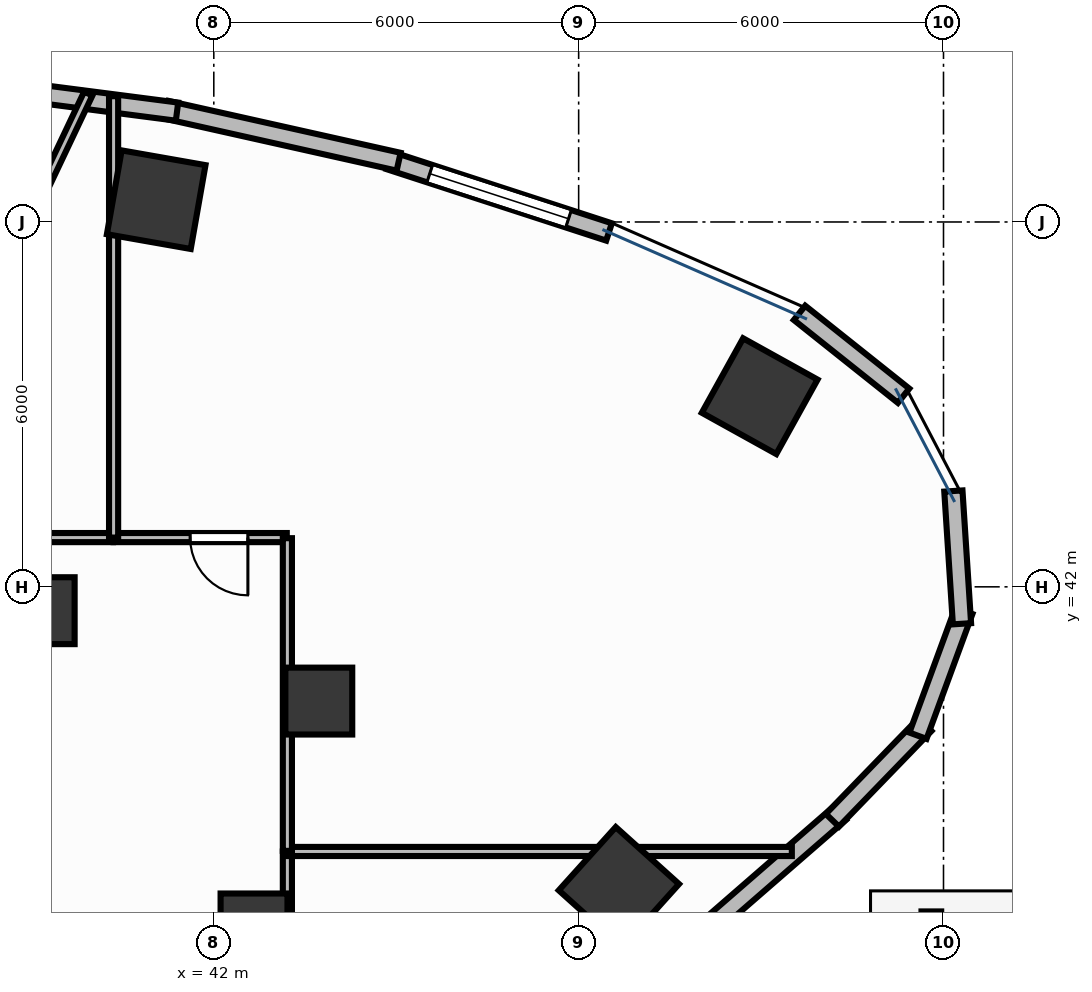
"""IFC4 building model, lengths in metres.
Left out: names, types, materials, properties, quantities, classifications, styles, units other than length and angle.
Written with IfcOpenShell. Run it as: python <this file> out.ifc"""

import sys

from ifc_helpers import new_model, si_unit, direction, frame, frame_2d, origin, origin_2d, place, context, subcontext, project, spatial, rectangle, hollow_circle, extrude, element, fill, save


model = new_model("IFC4")
c1 = context("Model", 3, precision=1e-05, world=origin(), true_north=direction((0.0, 1.0)))
c2 = subcontext(c1, "Body", "Model", "MODEL_VIEW")
j1 = project(units=[si_unit("LENGTHUNIT", "METRE"), si_unit("PLANEANGLEUNIT", "RADIAN")], contexts=[c1])
p1 = place(None, origin())
s1 = spatial("IfcSite", under=j1, at=p1, CompositionType="ELEMENT")
p2 = place(p1, origin())
s2 = spatial("IfcBuilding", under=s1, at=p2, CompositionType="ELEMENT")
p3 = place(p2, frame((0.0, 0.0, 10.2)))
s3 = spatial("IfcBuildingStorey", under=s2, at=p3, CompositionType="ELEMENT", Elevation=10.2)
p4 = place(p3, frame((50.977, 45.135, -0.0), z_axis=(0.0, 0.0, 1.0), x_axis=(-0.874535078577, 0.484962262797, 0.0)))
e1 = element("IfcColumn", 1, at=p4, inside=s3, PredefinedType="COLUMN", context=c2, shape_type="SweptSolid", body=[
    extrude(rectangle(XDim=1.4, YDim=1.4, at=origin_2d()), origin(), (0.0, 0.0, 1.0), 4.451),
])
p5 = place(p3, frame((43.727, 40.121, -0.0), z_axis=(0.0, 0.0, 1.0), x_axis=(1.0, 0.0, 0.0)))
e2 = element("IfcColumn", 2, at=p5, inside=s3, PredefinedType="COLUMN", context=c2, shape_type="SweptSolid", body=[
    extrude(rectangle(XDim=1.1, YDim=1.1, at=origin_2d()), origin(), (0.0, 0.0, 1.0), 4.451),
])
p6 = place(p3, frame((41.052, 48.367, -0.0), z_axis=(0.0, 0.0, 1.0), x_axis=(-0.984868307662, 0.173304404339, 0.0)))
e3 = element("IfcColumn", 3, at=p6, inside=s3, PredefinedType="COLUMN", context=c2, shape_type="SweptSolid", body=[
    extrude(rectangle(XDim=1.4, YDim=1.4, at=origin_2d()), origin(), (0.0, 0.0, 1.0), 4.451),
])
p7 = place(p3, frame((39.161, 41.608, -0.0), z_axis=(0.0, 0.0, 1.0), x_axis=(1.0, 0.0, 0.0)))
e4 = element("IfcColumn", 4, at=p7, inside=s3, PredefinedType="COLUMN", context=c2, shape_type="SweptSolid", body=[
    extrude(rectangle(XDim=1.1, YDim=1.1, at=origin_2d()), origin(), (0.0, 0.0, 1.0), 4.451),
])
p8 = place(p3, frame((48.662, 37.061, -0.0), z_axis=(0.0, 0.0, 1.0), x_axis=(0.669130606359, 0.743144825477, 0.0)))
e5 = element("IfcColumn", 5, at=p8, inside=s3, PredefinedType="COLUMN", context=c2, shape_type="SweptSolid", body=[
    extrude(rectangle(XDim=1.4, YDim=1.4, at=origin_2d()), origin(), (0.0, 0.0, 1.0), 4.451),
])
p9 = place(p3, frame((42.662, 36.407, -0.0), z_axis=(0.0, 0.0, 1.0), x_axis=(1.0, 0.0, 0.0)))
e6 = element("IfcColumn", 6, at=p9, inside=s3, PredefinedType="COLUMN", context=c2, shape_type="SweptSolid", body=[
    extrude(rectangle(XDim=1.1, YDim=1.1, at=origin_2d()), origin(), (0.0, 0.0, 1.0), 4.451),
])
p10 = place(p3, frame((53.8, 36.5, -0.24), z_axis=(0.0, 0.0, 1.0), x_axis=(1.0, 0.0, 0.0)))
e7 = element("IfcColumn", 7, at=p10, inside=s3, PredefinedType="COLUMN", context=c2, shape_type="SweptSolid", body=[
    extrude(hollow_circle(Radius=0.162, WallThickness=0.016, at=origin_2d()), origin(), (0.0, 0.0, 1.0), 5.04),
])
p11 = place(p3, frame((48.5, 47.836, 0.0), z_axis=(0.0, 0.0, 1.0), x_axis=(-0.950958033078, 0.30931993037, 0.0)))
e8 = element("IfcWall", 8, at=p11, inside=s3, PredefinedType="STANDARD", context=c2, shape_type="SweptSolid", body=[
    extrude(rectangle(XDim=3.8, YDim=0.3, at=frame_2d((1.9, 0.0))), origin(), (0.0, 0.0, 1.0), 4.45),
])
p12 = place(p11, frame((0.7, 0.0, 1.5)))
e9 = element("IfcOpeningElement", 9, at=p12, cuts=e8, PredefinedType="OPENING", context=c2, shape_type="SweptSolid", body=[
    extrude(rectangle(XDim=2.4, YDim=1.2, at=frame_2d((1.2, 0.6))), frame((0.0, 0.165, 0.0), z_axis=(0.0, -1.0, 0.0), x_axis=(1.0, 0.0, 0.0)), (0.0, 0.0, 1.0), 0.33),
])
p13 = place(p3, frame((45.04, 48.991, 0.0), z_axis=(0.0, 0.0, 1.0), x_axis=(-0.975868573345, 0.218358713032, 0.0)))
e10 = element("IfcWall", 10, at=p13, inside=s3, PredefinedType="STANDARD", context=c2, shape_type="SweptSolid", body=[
    extrude(rectangle(XDim=3.909, YDim=0.3, at=frame_2d((1.954, 0.0))), origin(), (0.0, 0.0, 1.0), 4.45),
])
p14 = place(p3, frame((41.395, 49.815, 0.0), z_axis=(0.0, 0.0, 1.0), x_axis=(-0.991734095036, 0.128310111617, 0.0)))
e11 = element("IfcWall", 11, at=p14, inside=s3, PredefinedType="STANDARD", context=c2, shape_type="SweptSolid", body=[
    extrude(rectangle(XDim=3.956, YDim=0.3, at=frame_2d((1.978, 0.0))), origin(), (0.0, 0.0, 1.0), 4.45),
])
p15 = place(p3, frame((49.709, 36.029, 0.0), z_axis=(0.0, 0.0, 1.0), x_axis=(0.754746490246, 0.656016566454, 0.0)))
e12 = element("IfcWall", 12, at=p15, inside=s3, PredefinedType="STANDARD", context=c2, shape_type="SweptSolid", body=[
    extrude(rectangle(XDim=3.43, YDim=0.3, at=frame_2d((1.715, 0.0))), origin(), (0.0, 0.0, 1.0), 4.45),
])
p16 = place(p3, frame((52.173, 38.161, 0.0), z_axis=(0.0, 0.0, 1.0), x_axis=(0.695404695719, 0.718618333451, 0.0)))
e13 = element("IfcWall", 13, at=p16, inside=s3, PredefinedType="STANDARD", context=c2, shape_type="SweptSolid", body=[
    extrude(rectangle(XDim=2.188, YDim=0.3, at=frame_2d((1.094, 0.0))), origin(), (0.0, 0.0, 1.0), 4.45),
])
for number, where, z_axis, x_axis in (
    (14, (53.58, 39.552, 0.0), (0.0, 0.0, 1.0), (0.345, 0.939, 0.0)),
    (15, (54.304, 41.393, 0.0), (0.0, 0.0, 1.0), (-0.065, 0.998, 0.0)),
    (16, (53.344, 45.143, 0.0), (0.0, 0.0, 1.0), (-0.782, 0.623, 0.0)),
):
    element("IfcWall", number, at=place(p3, frame(where, z_axis=z_axis, x_axis=x_axis)), inside=s3, PredefinedType="STANDARD", context=c2, shape_type="SweptSolid", body=[
        extrude(rectangle(XDim=2.188, YDim=0.3, at=frame_2d((1.094, 0.0))), origin(), (0.0, 0.0, 1.0), 4.45),
    ])
p17 = place(p3, frame((43.21, 26.635, 0.0), z_axis=(0.0, 0.0, 1.0), x_axis=(0.0, 1.0, 0.0)))
e17 = element("IfcWall", 17, at=p17, inside=s3, PredefinedType="PARTITIONING", context=c2, shape_type="SweptSolid", body=[
    extrude(rectangle(XDim=11.013, YDim=0.15, at=frame_2d((5.506, 0.0))), origin(), (0.0, 0.0, 1.0), 3.46),
])
p18 = place(p17, frame((3.85, 0.0, 0.0)))
e18 = element("IfcOpeningElement", 18, at=p18, cuts=e17, PredefinedType="OPENING", context=c2, shape_type="SweptSolid", body=[
    extrude(rectangle(XDim=0.95, YDim=2.15, at=frame_2d((0.475, 1.075))), frame((0.0, 0.09, 0.0), z_axis=(0.0, -1.0, 0.0), x_axis=(1.0, 0.0, 0.0)), (0.0, 0.0, 1.0), 0.18),
])
p19 = place(p3, frame((43.2, 42.81, 0.0), z_axis=(0.0, 0.0, 1.0), x_axis=(-1.0, 0.0, 0.0)))
e19 = element("IfcWall", 19, at=p19, inside=s3, PredefinedType="PARTITIONING", context=c2, shape_type="SweptSolid", body=[
    extrude(rectangle(XDim=2.848, YDim=0.15, at=frame_2d((1.424, 0.0))), origin(), (0.0, 0.0, 1.0), 3.46),
])
p20 = place(p19, frame((0.639, 0.0, 0.0)))
e20 = element("IfcOpeningElement", 20, at=p20, cuts=e19, PredefinedType="OPENING", context=c2, shape_type="SweptSolid", body=[
    extrude(rectangle(XDim=0.95, YDim=2.15, at=frame_2d((0.475, 1.075))), frame((0.0, 0.09, 0.0), z_axis=(0.0, -1.0, 0.0), x_axis=(1.0, 0.0, 0.0)), (0.0, 0.0, 1.0), 0.18),
])
p21 = place(p3, frame((40.342, 42.81, 0.0), z_axis=(0.0, 0.0, 1.0), x_axis=(-1.0, 0.0, 0.0)))
e21 = element("IfcWall", 21, at=p21, inside=s3, PredefinedType="PARTITIONING", context=c2, shape_type="SweptSolid", body=[
    extrude(rectangle(XDim=3.869, YDim=0.15, at=frame_2d((1.934, 0.0))), origin(), (0.0, 0.0, 1.0), 3.46),
])
p22 = place(p21, frame((2.427, 0.0, 0.0)))
e22 = element("IfcOpeningElement", 22, at=p22, cuts=e21, PredefinedType="OPENING", context=c2, shape_type="SweptSolid", body=[
    extrude(rectangle(XDim=0.95, YDim=2.15, at=frame_2d((0.475, 1.075))), frame((0.0, 0.09, 0.0), z_axis=(0.0, -1.0, 0.0), x_axis=(1.0, 0.0, 0.0)), (0.0, 0.0, 1.0), 0.18),
])
p23 = place(p3, frame((48.659, 37.648, 0.0), z_axis=(0.0, 0.0, 1.0), x_axis=(1.0, 0.0, 0.0)))
e23 = element("IfcWall", 23, at=p23, inside=s3, PredefinedType="PARTITIONING", context=c2, shape_type="SweptSolid", body=[
    extrude(rectangle(XDim=2.847, YDim=0.15, at=frame_2d((1.423, 0.0))), origin(), (0.0, 0.0, 1.0), 3.46),
])
p24 = place(p3, frame((43.21, 37.648, 0.0), z_axis=(0.0, 0.0, 1.0), x_axis=(1.0, 0.0, 0.0)))
e24 = element("IfcWall", 24, at=p24, inside=s3, PredefinedType="PARTITIONING", context=c2, shape_type="SweptSolid", body=[
    extrude(rectangle(XDim=5.441, YDim=0.15, at=frame_2d((2.72, 0.0))), origin(), (0.0, 0.0, 1.0), 3.46),
])
p25 = place(p3, frame((43.21, 37.658, 0.0), z_axis=(0.0, 0.0, 1.0), x_axis=(0.0, 1.0, 0.0)))
e25 = element("IfcWall", 25, at=p25, inside=s3, PredefinedType="PARTITIONING", context=c2, shape_type="SweptSolid", body=[
    extrude(rectangle(XDim=5.142, YDim=0.15, at=frame_2d((2.571, 0.0))), origin(), (0.0, 0.0, 1.0), 3.46),
])
p26 = place(p3, frame((40.352, 42.81, 0.0), z_axis=(0.0, 0.0, 1.0), x_axis=(0.0, 1.0, 0.0)))
e26 = element("IfcWall", 26, at=p26, inside=s3, PredefinedType="PARTITIONING", context=c2, shape_type="SweptSolid", body=[
    extrude(rectangle(XDim=7.259, YDim=0.15, at=frame_2d((3.629, 0.0))), origin(), (0.0, 0.0, 1.0), 3.46),
])
p27 = place(p3, frame((36.473, 42.81, 0.0), z_axis=(0.0, 0.0, 1.0), x_axis=(0.428481123873, 0.903550732657, 0.0)))
e27 = element("IfcWall", 27, at=p27, inside=s3, PredefinedType="PARTITIONING", context=c2, shape_type="SweptSolid", body=[
    extrude(rectangle(XDim=8.081, YDim=0.15, at=frame_2d((4.04, 0.0))), origin(), (0.0, 0.0, 1.0), 3.46),
])
p28 = place(p12, origin())
e28 = element("IfcWindow", 28, at=p28, inside=s3, PartitioningType="DOUBLE_PANEL_HORIZONTAL", PredefinedType="WINDOW", context=c2, shape_type="SweptSolid", body=[
    extrude(rectangle(XDim=2.4, YDim=1.2, at=frame_2d((1.2, 0.6))), frame((0.0, 0.03, 0.0), z_axis=(0.0, -1.0, 0.0), x_axis=(1.0, 0.0, 0.0)), (0.0, 0.0, 1.0), 0.06),
])
fill(e9, e28)
p29 = place(p20, origin())
e29 = element("IfcDoor", 29, at=p29, inside=s3, OperationType="SINGLE_SWING_LEFT", PredefinedType="DOOR", context=c2, shape_type="SweptSolid", body=[
    extrude(rectangle(XDim=0.95, YDim=2.15, at=frame_2d((0.475, 1.075))), frame((0.0, 0.025, 0.0), z_axis=(0.0, -1.0, 0.0), x_axis=(1.0, 0.0, 0.0)), (0.0, 0.0, 1.0), 0.05),
])
fill(e20, e29)
save(model, sys.argv[1])
